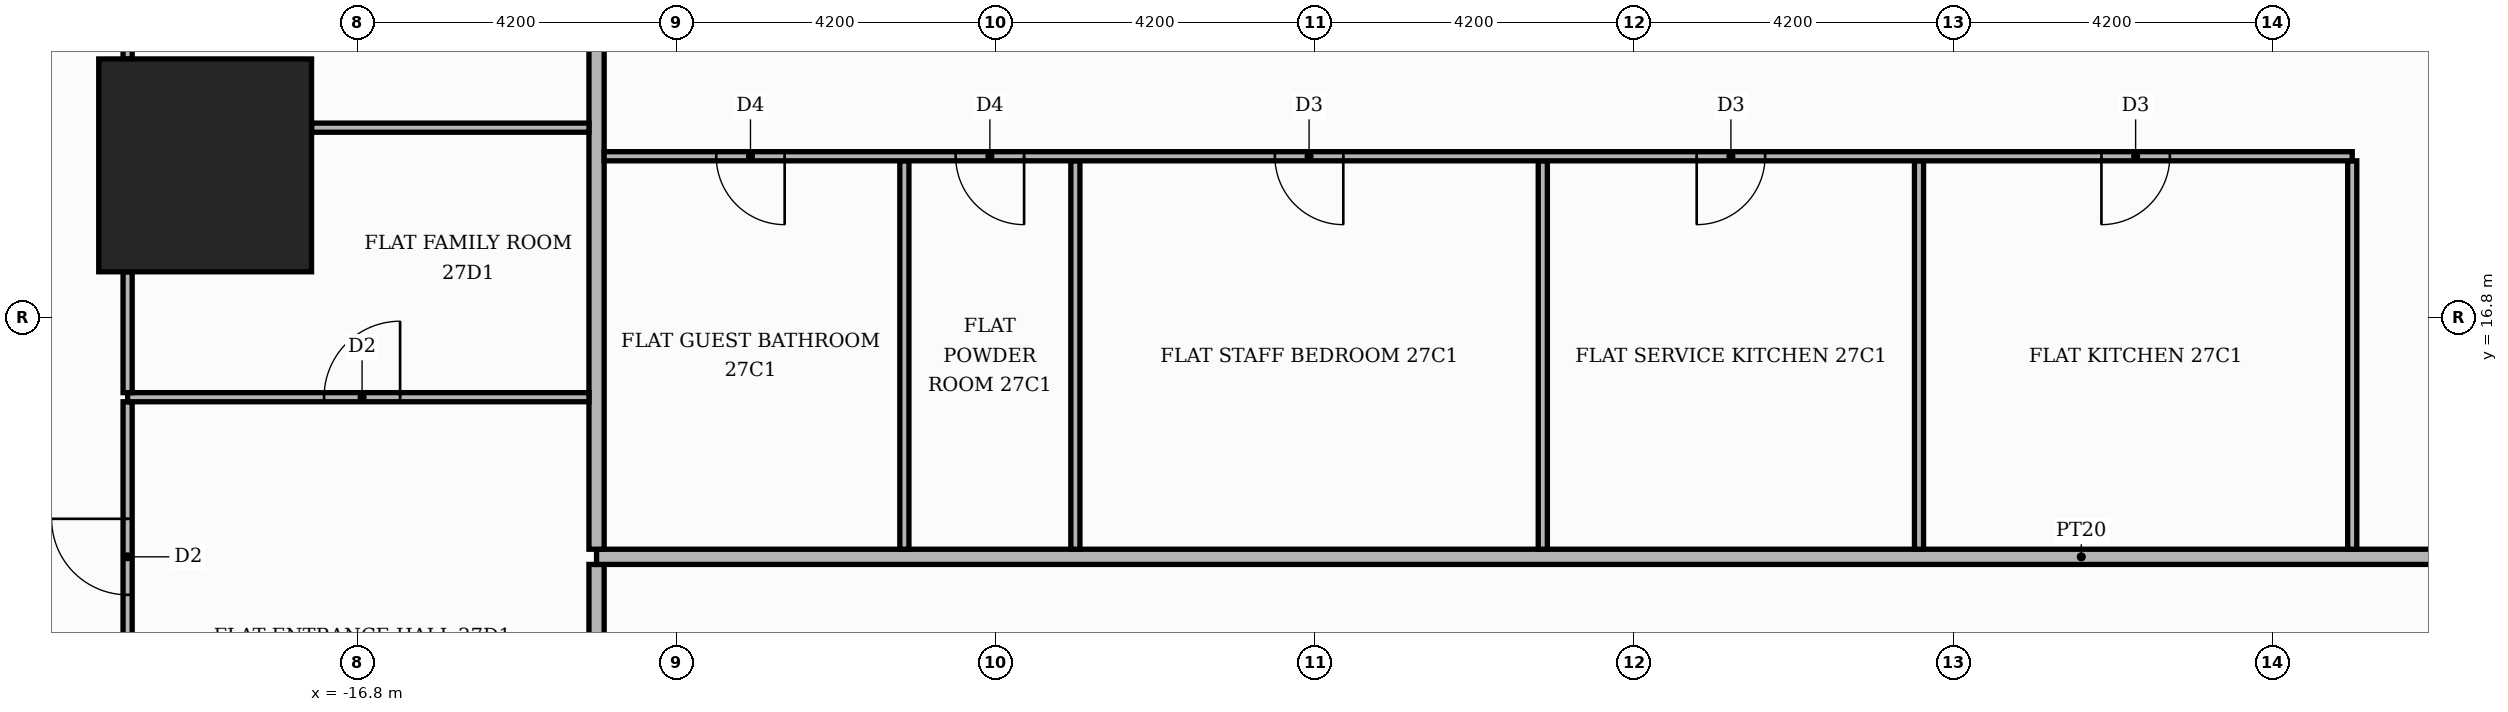
"""IFC4 building model, lengths in metres.
Left out: names, types, materials, properties, quantities, classifications, styles, units other than length and angle.
Written with IfcOpenShell. Run it as: python <this file> out.ifc"""

import sys

from ifc_helpers import new_model, si_unit, direction, frame, frame_2d, origin, origin_2d, place, context, subcontext, project, spatial, rectangle, extrude, element, fill, save


model = new_model("IFC4")
c1 = context("Model", 3, precision=1e-05, world=origin(), true_north=direction((0.0, 1.0)))
c2 = subcontext(c1, "Body", "Model", "MODEL_VIEW")
j1 = project(units=[si_unit("LENGTHUNIT", "METRE"), si_unit("PLANEANGLEUNIT", "RADIAN")], contexts=[c1])
p1 = place(None, origin())
s1 = spatial("IfcSite", under=j1, at=p1, CompositionType="ELEMENT")
p2 = place(p1, origin())
s2 = spatial("IfcBuilding", under=s1, at=p2, CompositionType="ELEMENT")
p3 = place(p2, frame((0.0, 0.0, 114.3)))
s3 = spatial("IfcBuildingStorey", under=s2, at=p3, CompositionType="ELEMENT", Elevation=114.3)
p4 = place(p3, frame((-18.8, 18.8, 0.0), z_axis=(0.0, 0.0, 1.0), x_axis=(1.0, 0.0, 0.0)))
e1 = element("IfcColumn", 1, at=p4, inside=s3, PredefinedType="COLUMN", context=c2, shape_type="SweptSolid", body=[
    extrude(rectangle(XDim=2.8, YDim=2.8, at=origin_2d()), origin(), (0.0, 0.0, 1.0), 3.9),
])
p5 = place(p3, frame((-13.65, 5.35, 0.0), z_axis=(0.0, 0.0, 1.0), x_axis=(0.0, 1.0, 0.0)))
e2 = element("IfcWall", 2, at=p5, inside=s3, PredefinedType="PARTITIONING", context=c2, shape_type="SweptSolid", body=[
    extrude(rectangle(XDim=8.2, YDim=0.2, at=frame_2d((4.1, 0.0))), origin(), (0.0, 0.0, 1.0), 3.48),
])
p6 = place(p5, frame((5.65, 0.0, 0.0)))
e3 = element("IfcOpeningElement", 3, at=p6, cuts=e2, PredefinedType="OPENING", context=c2, shape_type="SweptSolid", body=[
    extrude(rectangle(XDim=1.1, YDim=2.4, at=frame_2d((0.55, 1.2))), frame((0.0, 0.11, 0.0), z_axis=(0.0, -1.0, 0.0), x_axis=(1.0, 0.0, 0.0)), (0.0, 0.0, 1.0), 0.22),
])
p7 = place(p3, frame((-19.82, 11.61, 0.0), z_axis=(0.0, 0.0, 1.0), x_axis=(0.0, 1.0, 0.0)))
e4 = element("IfcWall", 4, at=p7, inside=s3, PredefinedType="PARTITIONING", context=c2, shape_type="SweptSolid", body=[
    extrude(rectangle(XDim=4.08, YDim=0.12, at=frame_2d((2.04, 0.0))), origin(), (0.0, 0.0, 1.0), 3.48),
])
p8 = place(p7, frame((1.54, 0.0, 0.0)))
e5 = element("IfcOpeningElement", 5, at=p8, cuts=e4, PredefinedType="OPENING", context=c2, shape_type="SweptSolid", body=[
    extrude(rectangle(XDim=1.0, YDim=2.1, at=frame_2d((0.5, 1.05))), frame((0.0, 0.07, 0.0), z_axis=(0.0, -1.0, 0.0), x_axis=(1.0, 0.0, 0.0)), (0.0, 0.0, 1.0), 0.14),
])
p9 = place(p3, frame((-13.65, 13.65, 0.0), z_axis=(0.0, 0.0, 1.0), x_axis=(1.0, 0.0, 0.0)))
e6 = element("IfcWall", 6, at=p9, inside=s3, PredefinedType="PARTITIONING", context=c2, shape_type="SweptSolid", body=[
    extrude(rectangle(XDim=39.07, YDim=0.2, at=frame_2d((19.535, 0.0))), origin(), (0.0, 0.0, 1.0), 3.48),
])
p10 = place(p9, frame((24.65, 0.0, 0.0)))
e7 = element("IfcOpeningElement", 7, at=p10, cuts=e6, PredefinedType="OPENING", context=c2, shape_type="SweptSolid", body=[
    extrude(rectangle(XDim=1.1, YDim=2.4, at=frame_2d((0.55, 1.2))), frame((0.0, 0.11, 0.0), z_axis=(0.0, -1.0, 0.0), x_axis=(1.0, 0.0, 0.0)), (0.0, 0.0, 1.0), 0.22),
])
p11 = place(p3, frame((-13.65, 13.75, 0.0), z_axis=(0.0, 0.0, 1.0), x_axis=(0.0, 1.0, 0.0)))
e8 = element("IfcWall", 8, at=p11, inside=s3, PredefinedType="PARTITIONING", context=c2, shape_type="SweptSolid", body=[
    extrude(rectangle(XDim=11.67, YDim=0.2, at=frame_2d((5.835, 0.0))), origin(), (0.0, 0.0, 1.0), 3.48),
])
for number, where, z_axis, x_axis in (
    (9, (-9.6, 13.75, 0.0), (0.0, 0.0, 1.0), (0.0, 1.0, 0.0)),
    (10, (-7.35, 13.75, 0.0), (0.0, 0.0, 1.0), (0.0, 1.0, 0.0)),
    (11, (-1.2, 13.75, 0.0), (0.0, 0.0, 1.0), (0.0, 1.0, 0.0)),
    (12, (3.75, 13.75, 0.0), (0.0, 0.0, 1.0), (0.0, 1.0, 0.0)),
    (13, (9.45, 13.75, 0.0), (0.0, 0.0, 1.0), (0.0, 1.0, 0.0)),
):
    element("IfcWall", number, at=place(p3, frame(where, z_axis=z_axis, x_axis=x_axis)), inside=s3, PredefinedType="PARTITIONING", context=c2, shape_type="SweptSolid", body=[
        extrude(rectangle(XDim=5.11, YDim=0.12, at=frame_2d((2.555, 0.0))), origin(), (0.0, 0.0, 1.0), 3.48),
    ])
p12 = place(p3, frame((-19.82, 15.75, 0.0), z_axis=(0.0, 0.0, 1.0), x_axis=(1.0, 0.0, 0.0)))
e14 = element("IfcWall", 14, at=p12, inside=s3, PredefinedType="PARTITIONING", context=c2, shape_type="SweptSolid", body=[
    extrude(rectangle(XDim=6.07, YDim=0.12, at=frame_2d((3.035, 0.0))), origin(), (0.0, 0.0, 1.0), 3.48),
])
p13 = place(p12, frame((2.585, 0.0, 0.0)))
e15 = element("IfcOpeningElement", 15, at=p13, cuts=e14, PredefinedType="OPENING", context=c2, shape_type="SweptSolid", body=[
    extrude(rectangle(XDim=1.0, YDim=2.1, at=frame_2d((0.5, 1.05))), frame((0.0, 0.07, 0.0), z_axis=(0.0, -1.0, 0.0), x_axis=(1.0, 0.0, 0.0)), (0.0, 0.0, 1.0), 0.14),
])
p14 = place(p3, frame((-19.82, 15.81, 0.0), z_axis=(0.0, 0.0, 1.0), x_axis=(0.0, 1.0, 0.0)))
e16 = element("IfcWall", 16, at=p14, inside=s3, PredefinedType="PARTITIONING", context=c2, shape_type="SweptSolid", body=[
    extrude(rectangle(XDim=1.59, YDim=0.12, at=frame_2d((0.795, 0.0))), origin(), (0.0, 0.0, 1.0), 3.48),
])
p15 = place(p3, frame((-13.55, 18.92, 0.0), z_axis=(0.0, 0.0, 1.0), x_axis=(1.0, 0.0, 0.0)))
e17 = element("IfcWall", 17, at=p15, inside=s3, PredefinedType="PARTITIONING", context=c2, shape_type="SweptSolid", body=[
    extrude(rectangle(XDim=23.0, YDim=0.12, at=frame_2d((11.5, 0.0))), origin(), (0.0, 0.0, 1.0), 3.48),
])
p16 = place(p15, frame((19.7, 0.0, 0.0)))
e18 = element("IfcOpeningElement", 18, at=p16, cuts=e17, PredefinedType="OPENING", context=c2, shape_type="SweptSolid", body=[
    extrude(rectangle(XDim=0.9, YDim=2.1, at=frame_2d((0.45, 1.05))), frame((0.0, 0.07, 0.0), z_axis=(0.0, -1.0, 0.0), x_axis=(1.0, 0.0, 0.0)), (0.0, 0.0, 1.0), 0.14),
])
p17 = place(p15, frame((14.375, 0.0, 0.0)))
e19 = element("IfcOpeningElement", 19, at=p17, cuts=e17, PredefinedType="OPENING", context=c2, shape_type="SweptSolid", body=[
    extrude(rectangle(XDim=0.9, YDim=2.1, at=frame_2d((0.45, 1.05))), frame((0.0, 0.07, 0.0), z_axis=(0.0, -1.0, 0.0), x_axis=(1.0, 0.0, 0.0)), (0.0, 0.0, 1.0), 0.14),
])
p18 = place(p15, frame((8.825, 0.0, 0.0)))
e20 = element("IfcOpeningElement", 20, at=p18, cuts=e17, PredefinedType="OPENING", context=c2, shape_type="SweptSolid", body=[
    extrude(rectangle(XDim=0.9, YDim=2.1, at=frame_2d((0.45, 1.05))), frame((0.0, 0.07, 0.0), z_axis=(0.0, -1.0, 0.0), x_axis=(1.0, 0.0, 0.0)), (0.0, 0.0, 1.0), 0.14),
])
p19 = place(p15, frame((4.625, 0.0, 0.0)))
e21 = element("IfcOpeningElement", 21, at=p19, cuts=e17, PredefinedType="OPENING", context=c2, shape_type="SweptSolid", body=[
    extrude(rectangle(XDim=0.9, YDim=2.1, at=frame_2d((0.45, 1.05))), frame((0.0, 0.07, 0.0), z_axis=(0.0, -1.0, 0.0), x_axis=(1.0, 0.0, 0.0)), (0.0, 0.0, 1.0), 0.14),
])
p20 = place(p15, frame((1.475, 0.0, 0.0)))
e22 = element("IfcOpeningElement", 22, at=p20, cuts=e17, PredefinedType="OPENING", context=c2, shape_type="SweptSolid", body=[
    extrude(rectangle(XDim=0.9, YDim=2.1, at=frame_2d((0.45, 1.05))), frame((0.0, 0.07, 0.0), z_axis=(0.0, -1.0, 0.0), x_axis=(1.0, 0.0, 0.0)), (0.0, 0.0, 1.0), 0.14),
])
p21 = place(p3, frame((-17.4, 19.296, 0.0), z_axis=(0.0, 0.0, 1.0), x_axis=(1.0, 0.0, 0.0)))
e23 = element("IfcWall", 23, at=p21, inside=s3, PredefinedType="PARTITIONING", context=c2, shape_type="SweptSolid", body=[
    extrude(rectangle(XDim=3.65, YDim=0.12, at=frame_2d((1.825, 0.0))), origin(), (0.0, 0.0, 1.0), 3.48),
])
p22 = place(p3, frame((-19.82, 20.2, 0.0), z_axis=(0.0, 0.0, 1.0), x_axis=(0.0, 1.0, 0.0)))
e24 = element("IfcWall", 24, at=p22, inside=s3, PredefinedType="PARTITIONING", context=c2, shape_type="SweptSolid", body=[
    extrude(rectangle(XDim=5.22, YDim=0.12, at=frame_2d((2.61, 0.0))), origin(), (0.0, 0.0, 1.0), 3.48),
])
p23 = place(p22, frame((2.31, 0.0, 0.0)))
e25 = element("IfcOpeningElement", 25, at=p23, cuts=e24, PredefinedType="OPENING", context=c2, shape_type="SweptSolid", body=[
    extrude(rectangle(XDim=0.9, YDim=2.1, at=frame_2d((0.45, 1.05))), frame((0.0, 0.07, 0.0), z_axis=(0.0, -1.0, 0.0), x_axis=(1.0, 0.0, 0.0)), (0.0, 0.0, 1.0), 0.14),
])
p24 = place(p16, frame((0.9, 0.0, 0.0), z_axis=(0.0, 0.0, 1.0), x_axis=(-1.0, 0.0, 0.0)))
e26 = element("IfcDoor", 26, at=p24, inside=s3, OperationType="SINGLE_SWING_LEFT", PredefinedType="DOOR", context=c2, shape_type="SweptSolid", body=[
    extrude(rectangle(XDim=0.9, YDim=2.1, at=frame_2d((0.45, 1.05))), frame((0.0, 0.025, 0.0), z_axis=(0.0, -1.0, 0.0), x_axis=(1.0, 0.0, 0.0)), (0.0, 0.0, 1.0), 0.05),
])
fill(e18, e26)
p25 = place(p17, frame((0.9, 0.0, 0.0), z_axis=(0.0, 0.0, 1.0), x_axis=(-1.0, 0.0, 0.0)))
e27 = element("IfcDoor", 27, at=p25, inside=s3, OperationType="SINGLE_SWING_LEFT", PredefinedType="DOOR", context=c2, shape_type="SweptSolid", body=[
    extrude(rectangle(XDim=0.9, YDim=2.1, at=frame_2d((0.45, 1.05))), frame((0.0, 0.025, 0.0), z_axis=(0.0, -1.0, 0.0), x_axis=(1.0, 0.0, 0.0)), (0.0, 0.0, 1.0), 0.05),
])
fill(e19, e27)
p26 = place(p18, frame((0.9, 0.0, 0.0), z_axis=(0.0, 0.0, 1.0), x_axis=(-1.0, 0.0, 0.0)))
e28 = element("IfcDoor", 28, at=p26, inside=s3, OperationType="SINGLE_SWING_RIGHT", PredefinedType="DOOR", context=c2, shape_type="SweptSolid", body=[
    extrude(rectangle(XDim=0.9, YDim=2.1, at=frame_2d((0.45, 1.05))), frame((0.0, 0.025, 0.0), z_axis=(0.0, -1.0, 0.0), x_axis=(1.0, 0.0, 0.0)), (0.0, 0.0, 1.0), 0.05),
])
fill(e20, e28)
p27 = place(p19, frame((0.9, 0.0, 0.0), z_axis=(0.0, 0.0, 1.0), x_axis=(-1.0, 0.0, 0.0)))
e29 = element("IfcDoor", 29, at=p27, inside=s3, OperationType="SINGLE_SWING_RIGHT", PredefinedType="DOOR", context=c2, shape_type="SweptSolid", body=[
    extrude(rectangle(XDim=0.9, YDim=2.1, at=frame_2d((0.45, 1.05))), frame((0.0, 0.025, 0.0), z_axis=(0.0, -1.0, 0.0), x_axis=(1.0, 0.0, 0.0)), (0.0, 0.0, 1.0), 0.05),
])
fill(e21, e29)
p28 = place(p20, frame((0.9, 0.0, 0.0), z_axis=(0.0, 0.0, 1.0), x_axis=(-1.0, 0.0, 0.0)))
e30 = element("IfcDoor", 30, at=p28, inside=s3, OperationType="SINGLE_SWING_RIGHT", PredefinedType="DOOR", context=c2, shape_type="SweptSolid", body=[
    extrude(rectangle(XDim=0.9, YDim=2.1, at=frame_2d((0.45, 1.05))), frame((0.0, 0.025, 0.0), z_axis=(0.0, -1.0, 0.0), x_axis=(1.0, 0.0, 0.0)), (0.0, 0.0, 1.0), 0.05),
])
fill(e22, e30)
p29 = place(p13, origin())
e31 = element("IfcDoor", 31, at=p29, inside=s3, OperationType="SINGLE_SWING_RIGHT", PredefinedType="DOOR", context=c2, shape_type="SweptSolid", body=[
    extrude(rectangle(XDim=1.0, YDim=2.1, at=frame_2d((0.5, 1.05))), frame((0.0, 0.025, 0.0), z_axis=(0.0, -1.0, 0.0), x_axis=(1.0, 0.0, 0.0)), (0.0, 0.0, 1.0), 0.05),
])
fill(e15, e31)
p30 = place(p8, origin())
e32 = element("IfcDoor", 32, at=p30, inside=s3, OperationType="SINGLE_SWING_RIGHT", PredefinedType="DOOR", context=c2, shape_type="SweptSolid", body=[
    extrude(rectangle(XDim=1.0, YDim=2.1, at=frame_2d((0.5, 1.05))), frame((0.0, 0.025, 0.0), z_axis=(0.0, -1.0, 0.0), x_axis=(1.0, 0.0, 0.0)), (0.0, 0.0, 1.0), 0.05),
])
fill(e5, e32)
save(model, sys.argv[1])
